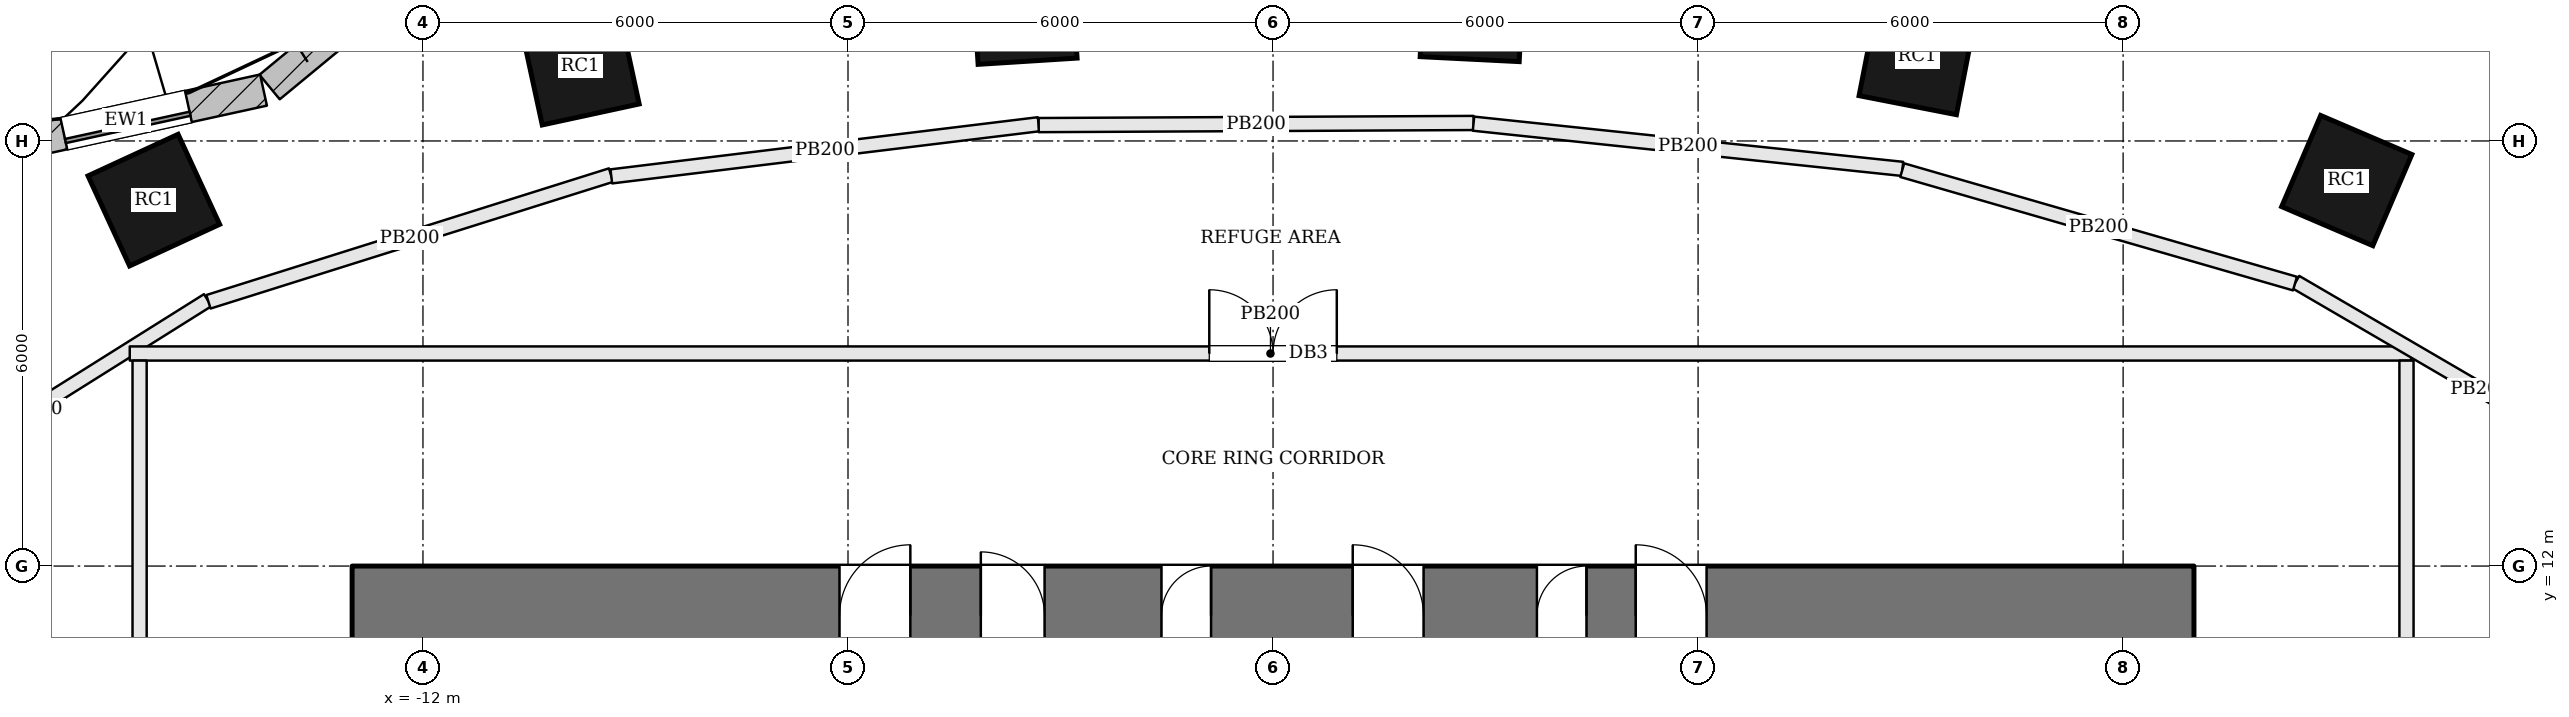
"""IFC4 building model, lengths in metres.
Left out: names, types, materials, properties, quantities, classifications, styles, units other than length and angle.
Written with IfcOpenShell. Run it as: python <this file> out.ifc"""

import sys

from ifc_helpers import new_model, si_unit, direction, frame, frame_2d, origin, origin_2d, place, context, subcontext, project, spatial, rectangle, extrude, element, fill, save


model = new_model("IFC4")
c1 = context("Model", 3, precision=1e-05, world=origin(), true_north=direction((0.0, 1.0)))
c2 = subcontext(c1, "Body", "Model", "MODEL_VIEW")
j1 = project(units=[si_unit("LENGTHUNIT", "METRE"), si_unit("PLANEANGLEUNIT", "RADIAN")], contexts=[c1])
p1 = place(None, origin())
s1 = spatial("IfcSite", under=j1, at=p1, CompositionType="ELEMENT")
p2 = place(p1, origin())
s2 = spatial("IfcBuilding", under=s1, at=p2, CompositionType="ELEMENT")
p3 = place(p2, frame((0.0, 0.0, 55.5)))
s3 = spatial("IfcBuildingStorey", under=s2, at=p3, CompositionType="ELEMENT", Elevation=55.5)
p4 = place(p3, frame((-13.0, 11.3, 0.0), z_axis=(0.0, 0.0, 1.0), x_axis=(1.0, 0.0, 0.0)))
e1 = element("IfcWall", 1, at=p4, inside=s3, PredefinedType="SHEAR", context=c2, shape_type="SweptSolid", body=[
    extrude(rectangle(XDim=26.0, YDim=1.4, at=frame_2d((13.0, 0.0))), origin(), (0.0, 0.0, 1.0), 3.6),
])
p5 = place(p4, frame((8.875, 0.0, 0.0)))
e2 = element("IfcOpeningElement", 2, at=p5, cuts=e1, PredefinedType="OPENING", context=c2, shape_type="SweptSolid", body=[
    extrude(rectangle(XDim=0.9, YDim=2.1, at=frame_2d((0.45, 1.05))), frame((0.0, 0.71, 0.0), z_axis=(0.0, -1.0, 0.0), x_axis=(1.0, 0.0, 0.0)), (0.0, 0.0, 1.0), 1.42),
])
p6 = place(p4, frame((11.425, 0.0, 0.0)))
e3 = element("IfcOpeningElement", 3, at=p6, cuts=e1, PredefinedType="OPENING", context=c2, shape_type="SweptSolid", body=[
    extrude(rectangle(XDim=0.7, YDim=2.1, at=frame_2d((0.35, 1.05))), frame((0.0, 0.71, 0.0), z_axis=(0.0, -1.0, 0.0), x_axis=(1.0, 0.0, 0.0)), (0.0, 0.0, 1.0), 1.42),
])
p7 = place(p4, frame((14.125, 0.0, 0.0)))
e4 = element("IfcOpeningElement", 4, at=p7, cuts=e1, PredefinedType="OPENING", context=c2, shape_type="SweptSolid", body=[
    extrude(rectangle(XDim=1.0, YDim=2.1, at=frame_2d((0.5, 1.05))), frame((0.0, 0.71, 0.0), z_axis=(0.0, -1.0, 0.0), x_axis=(1.0, 0.0, 0.0)), (0.0, 0.0, 1.0), 1.42),
])
p8 = place(p4, frame((16.725, 0.0, 0.0)))
e5 = element("IfcOpeningElement", 5, at=p8, cuts=e1, PredefinedType="OPENING", context=c2, shape_type="SweptSolid", body=[
    extrude(rectangle(XDim=0.7, YDim=2.1, at=frame_2d((0.35, 1.05))), frame((0.0, 0.71, 0.0), z_axis=(0.0, -1.0, 0.0), x_axis=(1.0, 0.0, 0.0)), (0.0, 0.0, 1.0), 1.42),
])
p9 = place(p4, frame((6.88, 0.0, 0.0)))
e6 = element("IfcOpeningElement", 6, at=p9, cuts=e1, PredefinedType="OPENING", context=c2, shape_type="SweptSolid", body=[
    extrude(rectangle(XDim=1.0, YDim=2.1, at=frame_2d((0.5, 1.05))), frame((0.0, 0.71, 0.0), z_axis=(0.0, -1.0, 0.0), x_axis=(1.0, 0.0, 0.0)), (0.0, 0.0, 1.0), 1.42),
])
p10 = place(p4, frame((18.12, 0.0, 0.0)))
e7 = element("IfcOpeningElement", 7, at=p10, cuts=e1, PredefinedType="OPENING", context=c2, shape_type="SweptSolid", body=[
    extrude(rectangle(XDim=1.0, YDim=2.1, at=frame_2d((0.5, 1.05))), frame((0.0, 0.71, 0.0), z_axis=(0.0, -1.0, 0.0), x_axis=(1.0, 0.0, 0.0)), (0.0, 0.0, 1.0), 1.42),
])
for number, where, z_axis, x_axis in (
    (8, (15.157, 17.441, 0.0), (0.0, 0.0, 1.0), (-0.919, 0.394, 0.0)),
    (9, (9.094, 19.192, 0.0), (0.0, 0.0, 1.0), (-0.981, 0.192, 0.0)),
    (10, (2.811, 19.854, 0.0), (0.0, 0.0, 1.0), (-0.999, 0.05, 0.0)),
    (11, (-3.509, 19.824, 0.0), (0.0, 0.0, 1.0), (-0.998, -0.063, 0.0)),
    (12, (-9.78, 19.058, 0.0), (0.0, 0.0, 1.0), (-0.977, -0.211, 0.0)),
    (13, (-15.799, 17.165, 0.0), (0.0, 0.0, 1.0), (-0.908, -0.419, 0.0)),
):
    element("IfcColumn", number, at=place(p3, frame(where, z_axis=z_axis, x_axis=x_axis)), inside=s3, PredefinedType="COLUMN", context=c2, shape_type="SweptSolid", body=[
        extrude(rectangle(XDim=1.4, YDim=1.4, at=origin_2d()), origin(), (0.0, 0.0, 1.0), 3.6),
    ])
p11 = place(p3, frame((-10.879, 21.473, 0.0), z_axis=(0.0, 0.0, 1.0), x_axis=(-0.77124668946, -0.636536365023, 0.0)))
e14 = element("IfcWall", 14, at=p11, inside=s3, PredefinedType="SOLIDWALL", context=c2, shape_type="SweptSolid", body=[
    extrude(rectangle(XDim=4.261, YDim=0.45, at=frame_2d((2.13, 0.0))), origin(), (0.0, 0.0, 1.0), 3.4),
])
p12 = place(p11, frame((1.08, 0.0, 0.9)))
e15 = element("IfcOpeningElement", 15, at=p12, cuts=e14, PredefinedType="OPENING", context=c2, shape_type="SweptSolid", body=[
    extrude(rectangle(XDim=2.1, YDim=2.0, at=frame_2d((1.05, 1.0))), frame((0.0, 0.235, 0.0), z_axis=(0.0, -1.0, 0.0), x_axis=(1.0, 0.0, 0.0)), (0.0, 0.0, 1.0), 0.47),
])
p13 = place(p3, frame((-14.251, 18.718, 0.0), z_axis=(0.0, 0.0, 1.0), x_axis=(-0.976903627618, -0.213680374267, 0.0)))
e16 = element("IfcWall", 16, at=p13, inside=s3, PredefinedType="SOLIDWALL", context=c2, shape_type="SweptSolid", body=[
    extrude(rectangle(XDim=3.97, YDim=0.45, at=frame_2d((1.985, 0.0))), origin(), (0.0, 0.0, 1.0), 3.4),
])
p14 = place(p13, frame((1.085, 0.0, 0.9)))
e17 = element("IfcOpeningElement", 17, at=p14, cuts=e16, PredefinedType="OPENING", context=c2, shape_type="SweptSolid", body=[
    extrude(rectangle(XDim=1.8, YDim=2.0, at=frame_2d((0.9, 1.0))), frame((0.0, 0.235, 0.0), z_axis=(0.0, -1.0, 0.0), x_axis=(1.0, 0.0, 0.0)), (0.0, 0.0, 1.0), 0.47),
])
p15 = place(p3, frame((-19.962, 12.664, 0.0), z_axis=(0.0, 0.0, 1.0), x_axis=(0.847109868331, 0.531417793243, 0.0)))
e18 = element("IfcWall", 18, at=p15, inside=s3, PredefinedType="PARTITIONING", context=c2, shape_type="SweptSolid", body=[
    extrude(rectangle(XDim=5.812, YDim=0.2, at=frame_2d((2.906, 0.0))), origin(), (0.0, 0.0, 1.0), 3.4),
])
p16 = place(p3, frame((-16.139, 15.0, 0.0), z_axis=(0.0, 0.0, 1.0), x_axis=(1.0, 0.0, 0.0)))
e19 = element("IfcWall", 19, at=p16, inside=s3, PredefinedType="PARTITIONING", context=c2, shape_type="SweptSolid", body=[
    extrude(rectangle(XDim=32.205, YDim=0.2, at=frame_2d((16.103, 0.0))), origin(), (0.0, 0.0, 1.0), 3.4),
])
p17 = place(p16, frame((15.239, 0.0, 0.0)))
e20 = element("IfcOpeningElement", 20, at=p17, cuts=e19, PredefinedType="OPENING", context=c2, shape_type="SweptSolid", body=[
    extrude(rectangle(XDim=1.8, YDim=2.1, at=frame_2d((0.9, 1.05))), frame((0.0, 0.11, 0.0), z_axis=(0.0, -1.0, 0.0), x_axis=(1.0, 0.0, 0.0)), (0.0, 0.0, 1.0), 0.22),
])
p18 = place(p3, frame((-16.0, 14.9, 0.0), z_axis=(0.0, 0.0, 1.0), x_axis=(0.0, -1.0, 0.0)))
e21 = element("IfcWall", 21, at=p18, inside=s3, PredefinedType="PARTITIONING", context=c2, shape_type="SweptSolid", body=[
    extrude(rectangle(XDim=20.8, YDim=0.2, at=frame_2d((10.4, 0.0))), origin(), (0.0, 0.0, 1.0), 3.4),
])
p19 = place(p18, frame((9.5, 0.0, 0.0)))
e22 = element("IfcOpeningElement", 22, at=p19, cuts=e21, PredefinedType="OPENING", context=c2, shape_type="SweptSolid", body=[
    extrude(rectangle(XDim=1.8, YDim=2.1, at=frame_2d((0.9, 1.05))), frame((0.0, 0.11, 0.0), z_axis=(0.0, -1.0, 0.0), x_axis=(1.0, 0.0, 0.0)), (0.0, 0.0, 1.0), 0.22),
])
p20 = place(p3, frame((14.436, 16.009, 0.0), z_axis=(0.0, 0.0, 1.0), x_axis=(0.863814140683, -0.503810609611, 0.0)))
e23 = element("IfcWall", 23, at=p20, inside=s3, PredefinedType="PARTITIONING", context=c2, shape_type="SweptSolid", body=[
    extrude(rectangle(XDim=6.03, YDim=0.2, at=frame_2d((3.015, 0.0))), origin(), (0.0, 0.0, 1.0), 3.4),
])
p21 = place(p3, frame((16.0, -5.9, 0.0), z_axis=(0.0, 0.0, 1.0), x_axis=(0.0, 1.0, 0.0)))
e24 = element("IfcWall", 24, at=p21, inside=s3, PredefinedType="PARTITIONING", context=c2, shape_type="SweptSolid", body=[
    extrude(rectangle(XDim=20.8, YDim=0.2, at=frame_2d((10.4, 0.0))), origin(), (0.0, 0.0, 1.0), 3.4),
])
p22 = place(p21, frame((9.5, 0.0, 0.0)))
e25 = element("IfcOpeningElement", 25, at=p22, cuts=e24, PredefinedType="OPENING", context=c2, shape_type="SweptSolid", body=[
    extrude(rectangle(XDim=1.8, YDim=2.1, at=frame_2d((0.9, 1.05))), frame((0.0, 0.11, 0.0), z_axis=(0.0, -1.0, 0.0), x_axis=(1.0, 0.0, 0.0)), (0.0, 0.0, 1.0), 0.22),
])
p23 = place(p3, frame((-15.028, 15.73, 0.0), z_axis=(0.0, 0.0, 1.0), x_axis=(0.953899230101, 0.300127071108, 0.0)))
e26 = element("IfcWall", 26, at=p23, inside=s3, PredefinedType="PARTITIONING", context=c2, shape_type="SweptSolid", body=[
    extrude(rectangle(XDim=5.958, YDim=0.2, at=frame_2d((2.979, 0.0))), origin(), (0.0, 0.0, 1.0), 3.4),
])
p24 = place(p3, frame((-9.341, 17.5, 0.0), z_axis=(0.0, 0.0, 1.0), x_axis=(0.992636454539, 0.121131618992, 0.0)))
e27 = element("IfcWall", 27, at=p24, inside=s3, PredefinedType="PARTITIONING", context=c2, shape_type="SweptSolid", body=[
    extrude(rectangle(XDim=6.077, YDim=0.2, at=frame_2d((3.038, 0.0))), origin(), (0.0, 0.0, 1.0), 3.4),
])
p25 = place(p3, frame((-3.308, 18.224, 0.0), z_axis=(0.0, 0.0, 1.0), x_axis=(0.999988230875, 0.004851609169, 0.0)))
e28 = element("IfcWall", 28, at=p25, inside=s3, PredefinedType="PARTITIONING", context=c2, shape_type="SweptSolid", body=[
    extrude(rectangle(XDim=6.139, YDim=0.2, at=frame_2d((3.07, 0.0))), origin(), (0.0, 0.0, 1.0), 3.4),
])
p26 = place(p3, frame((2.83, 18.244, 0.0), z_axis=(0.0, 0.0, 1.0), x_axis=(0.994495561058, -0.10477871461, 0.0)))
e29 = element("IfcWall", 29, at=p26, inside=s3, PredefinedType="PARTITIONING", context=c2, shape_type="SweptSolid", body=[
    extrude(rectangle(XDim=6.088, YDim=0.2, at=frame_2d((3.044, 0.0))), origin(), (0.0, 0.0, 1.0), 3.4),
])
p27 = place(p3, frame((8.882, 17.588, 0.0), z_axis=(0.0, 0.0, 1.0), x_axis=(0.960749021242, -0.277419029958, 0.0)))
e30 = element("IfcWall", 30, at=p27, inside=s3, PredefinedType="PARTITIONING", context=c2, shape_type="SweptSolid", body=[
    extrude(rectangle(XDim=5.771, YDim=0.2, at=frame_2d((2.885, 0.0))), origin(), (0.0, 0.0, 1.0), 3.4),
])
p28 = place(p14, origin())
e31 = element("IfcWindow", 31, at=p28, inside=s3, PartitioningType="SINGLE_PANEL", PredefinedType="WINDOW", context=c2, shape_type="SweptSolid", body=[
    extrude(rectangle(XDim=1.8, YDim=2.0, at=frame_2d((0.9, 1.0))), frame((0.0, 0.135, 0.0), z_axis=(0.0, -1.0, 0.0), x_axis=(1.0, 0.0, 0.0)), (0.0, 0.0, 1.0), 0.06),
])
fill(e17, e31)
p29 = place(p5, origin())
e32 = element("IfcDoor", 32, at=p29, inside=s3, OperationType="SINGLE_SWING_LEFT", PredefinedType="DOOR", context=c2, shape_type="SweptSolid", body=[
    extrude(rectangle(XDim=0.9, YDim=2.1, at=frame_2d((0.45, 1.05))), frame((0.0, 0.025, 0.0), z_axis=(0.0, -1.0, 0.0), x_axis=(1.0, 0.0, 0.0)), (0.0, 0.0, 1.0), 0.05),
])
fill(e2, e32)
p30 = place(p6, origin())
e33 = element("IfcDoor", 33, at=p30, inside=s3, OperationType="SINGLE_SWING_RIGHT", PredefinedType="DOOR", context=c2, shape_type="SweptSolid", body=[
    extrude(rectangle(XDim=0.7, YDim=2.1, at=frame_2d((0.35, 1.05))), frame((0.0, 0.025, 0.0), z_axis=(0.0, -1.0, 0.0), x_axis=(1.0, 0.0, 0.0)), (0.0, 0.0, 1.0), 0.05),
])
fill(e3, e33)
p31 = place(p7, origin())
e34 = element("IfcDoor", 34, at=p31, inside=s3, OperationType="SINGLE_SWING_LEFT", PredefinedType="DOOR", context=c2, shape_type="SweptSolid", body=[
    extrude(rectangle(XDim=1.0, YDim=2.1, at=frame_2d((0.5, 1.05))), frame((0.0, 0.025, 0.0), z_axis=(0.0, -1.0, 0.0), x_axis=(1.0, 0.0, 0.0)), (0.0, 0.0, 1.0), 0.05),
])
fill(e4, e34)
p32 = place(p8, origin())
e35 = element("IfcDoor", 35, at=p32, inside=s3, OperationType="SINGLE_SWING_RIGHT", PredefinedType="DOOR", context=c2, shape_type="SweptSolid", body=[
    extrude(rectangle(XDim=0.7, YDim=2.1, at=frame_2d((0.35, 1.05))), frame((0.0, 0.025, 0.0), z_axis=(0.0, -1.0, 0.0), x_axis=(1.0, 0.0, 0.0)), (0.0, 0.0, 1.0), 0.05),
])
fill(e5, e35)
p33 = place(p9, origin())
e36 = element("IfcDoor", 36, at=p33, inside=s3, OperationType="SINGLE_SWING_RIGHT", PredefinedType="DOOR", context=c2, shape_type="SweptSolid", body=[
    extrude(rectangle(XDim=1.0, YDim=2.1, at=frame_2d((0.5, 1.05))), frame((0.0, 0.025, 0.0), z_axis=(0.0, -1.0, 0.0), x_axis=(1.0, 0.0, 0.0)), (0.0, 0.0, 1.0), 0.05),
])
fill(e6, e36)
p34 = place(p10, origin())
e37 = element("IfcDoor", 37, at=p34, inside=s3, OperationType="SINGLE_SWING_LEFT", PredefinedType="DOOR", context=c2, shape_type="SweptSolid", body=[
    extrude(rectangle(XDim=1.0, YDim=2.1, at=frame_2d((0.5, 1.05))), frame((0.0, 0.025, 0.0), z_axis=(0.0, -1.0, 0.0), x_axis=(1.0, 0.0, 0.0)), (0.0, 0.0, 1.0), 0.05),
])
fill(e7, e37)
p35 = place(p17, origin())
e38 = element("IfcDoor", 38, at=p35, inside=s3, OperationType="DOUBLE_DOOR_SINGLE_SWING", PredefinedType="DOOR", context=c2, shape_type="SweptSolid", body=[
    extrude(rectangle(XDim=1.8, YDim=2.1, at=frame_2d((0.9, 1.05))), frame((0.0, 0.025, 0.0), z_axis=(0.0, -1.0, 0.0), x_axis=(1.0, 0.0, 0.0)), (0.0, 0.0, 1.0), 0.05),
])
fill(e20, e38)
save(model, sys.argv[1])
